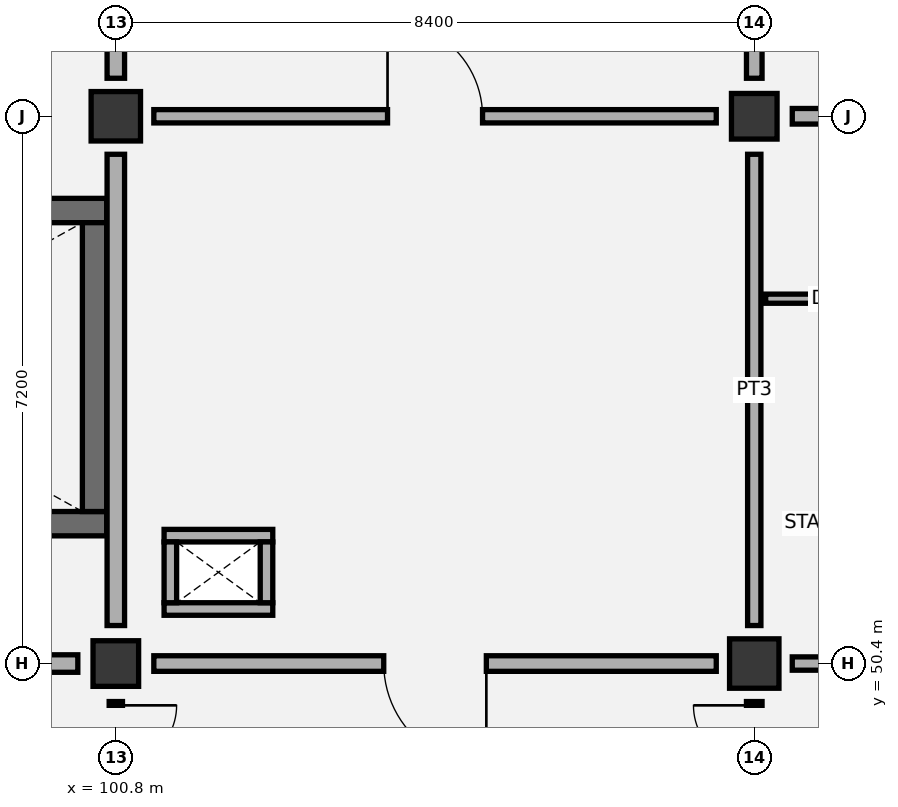
"""IFC4 building model, lengths in metres.
Left out: names, types, materials, properties, quantities, classifications, styles, units other than length and angle.
Written with IfcOpenShell. Run it as: python <this file> out.ifc"""

import sys

from ifc_helpers import new_model, si_unit, direction, frame, frame_2d, origin, origin_2d, place, context, subcontext, project, spatial, rectangle, extrude, element, fill, save


model = new_model("IFC4")
c1 = context("Model", 3, precision=1e-05, world=origin(), true_north=direction((0.0, 1.0)))
c2 = subcontext(c1, "Body", "Model", "MODEL_VIEW")
j1 = project(units=[si_unit("LENGTHUNIT", "METRE"), si_unit("PLANEANGLEUNIT", "RADIAN")], contexts=[c1])
p1 = place(None, origin())
s1 = spatial("IfcSite", under=j1, at=p1, CompositionType="ELEMENT")
p2 = place(p1, origin())
s2 = spatial("IfcBuilding", under=s1, at=p2, CompositionType="ELEMENT")
p3 = place(p2, frame((0.0, 0.0, 52.2)))
s3 = spatial("IfcBuildingStorey", under=s2, at=p3, CompositionType="ELEMENT", Elevation=52.2)
p4 = place(p3, frame((100.8, 50.4, 0.0), z_axis=(0.0, 0.0, 1.0), x_axis=(1.0, 0.0, 0.0)))
e1 = element("IfcColumn", 1, at=p4, inside=s3, PredefinedType="COLUMN", context=c2, shape_type="SweptSolid", body=[
    extrude(rectangle(XDim=0.6, YDim=0.6, at=origin_2d()), origin(), (0.0, 0.0, 1.0), 4.2),
])
for number, where, z_axis, x_axis in (
    (2, (100.8, 57.6, 0.0), (0.0, 0.0, 1.0), (1.0, 0.0, 0.0)),
    (3, (109.2, 50.4, 0.0), (0.0, 0.0, 1.0), (1.0, 0.0, 0.0)),
):
    element("IfcColumn", number, at=place(p3, frame(where, z_axis=z_axis, x_axis=x_axis)), inside=s3, PredefinedType="COLUMN", context=c2, shape_type="SweptSolid", body=[
        extrude(rectangle(XDim=0.65, YDim=0.65, at=origin_2d()), origin(), (0.0, 0.0, 1.0), 4.2),
    ])
p5 = place(p3, frame((109.2, 57.6, 0.0), z_axis=(0.0, 0.0, 1.0), x_axis=(1.0, 0.0, 0.0)))
e4 = element("IfcColumn", 4, at=p5, inside=s3, PredefinedType="COLUMN", context=c2, shape_type="SweptSolid", body=[
    extrude(rectangle(XDim=0.6, YDim=0.6, at=origin_2d()), origin(), (0.0, 0.0, 1.0), 4.2),
])
p6 = place(p3, frame((93.2, 52.24, 0.0), z_axis=(0.0, 0.0, 1.0), x_axis=(1.0, 0.0, 0.0)))
e5 = element("IfcWall", 5, at=p6, inside=s3, PredefinedType="SHEAR", context=c2, shape_type="SweptSolid", body=[
    extrude(rectangle(XDim=7.48, YDim=0.32, at=frame_2d((3.74, 0.0))), origin(), (0.0, 0.0, 1.0), 3.92),
])
p7 = place(p6, frame((0.45, 0.0, 0.0)))
e6 = element("IfcOpeningElement", 6, at=p7, cuts=e5, PredefinedType="OPENING", context=c2, shape_type="SweptSolid", body=[
    extrude(rectangle(XDim=1.05, YDim=2.15, at=frame_2d((0.525, 1.075))), frame((0.0, 0.17, 0.0), z_axis=(0.0, -1.0, 0.0), x_axis=(1.0, 0.0, 0.0)), (0.0, 0.0, 1.0), 0.34),
])
p8 = place(p3, frame((93.2, 56.36, 0.0), z_axis=(0.0, 0.0, 1.0), x_axis=(1.0, 0.0, 0.0)))
e7 = element("IfcWall", 7, at=p8, inside=s3, PredefinedType="SHEAR", context=c2, shape_type="SweptSolid", body=[
    extrude(rectangle(XDim=7.48, YDim=0.32, at=frame_2d((3.74, 0.0))), origin(), (0.0, 0.0, 1.0), 3.92),
])
p9 = place(p3, frame((100.52, 52.4, 0.0), z_axis=(0.0, 0.0, 1.0), x_axis=(0.0, 1.0, 0.0)))
e8 = element("IfcWall", 8, at=p9, inside=s3, PredefinedType="SHEAR", context=c2, shape_type="SweptSolid", body=[
    extrude(rectangle(XDim=3.8, YDim=0.32, at=frame_2d((1.9, 0.0))), origin(), (0.0, 0.0, 1.0), 3.92),
])
for number, where, z_axis, x_axis in (
    (9, (101.435, 51.117, 0.0), (0.0, 0.0, 1.0), (1.0, 0.0, 0.0)),
    (10, (101.435, 52.083, 0.0), (0.0, 0.0, 1.0), (1.0, 0.0, 0.0)),
):
    element("IfcWall", number, at=place(p3, frame(where, z_axis=z_axis, x_axis=x_axis)), inside=s3, PredefinedType="PARTITIONING", context=c2, shape_type="SweptSolid", body=[
        extrude(rectangle(XDim=1.43, YDim=0.165, at=frame_2d((0.715, 0.0))), origin(), (0.0, 0.0, 1.0), 3.92),
    ])
for number, where, z_axis, x_axis in (
    (11, (101.518, 51.2, 0.0), (0.0, 0.0, 1.0), (0.0, 1.0, 0.0)),
    (12, (102.782, 51.2, 0.0), (0.0, 0.0, 1.0), (0.0, 1.0, 0.0)),
):
    element("IfcWall", number, at=place(p3, frame(where, z_axis=z_axis, x_axis=x_axis)), inside=s3, PredefinedType="PARTITIONING", context=c2, shape_type="SweptSolid", body=[
        extrude(rectangle(XDim=0.8, YDim=0.165, at=frame_2d((0.4, 0.0))), origin(), (0.0, 0.0, 1.0), 3.92),
    ])
p10 = place(p3, frame((109.35, 55.2, 0.0), z_axis=(0.0, 0.0, 1.0), x_axis=(1.0, 0.0, 0.0)))
e13 = element("IfcWall", 13, at=p10, inside=s3, PredefinedType="PARTITIONING", context=c2, shape_type="SweptSolid", body=[
    extrude(rectangle(XDim=8.1, YDim=0.12, at=frame_2d((4.05, 0.0))), origin(), (0.0, 0.0, 1.0), 3.92),
])
p11 = place(p10, frame((1.08, 0.0, 0.0)))
e14 = element("IfcOpeningElement", 14, at=p11, cuts=e13, PredefinedType="OPENING", context=c2, shape_type="SweptSolid", body=[
    extrude(rectangle(XDim=0.95, YDim=2.1, at=frame_2d((0.475, 1.05))), frame((0.0, 0.07, 0.0), z_axis=(0.0, -1.0, 0.0), x_axis=(1.0, 0.0, 0.0)), (0.0, 0.0, 1.0), 0.14),
])
p12 = place(p10, frame((3.63, 0.0, 0.0)))
e15 = element("IfcOpeningElement", 15, at=p12, cuts=e13, PredefinedType="OPENING", context=c2, shape_type="SweptSolid", body=[
    extrude(rectangle(XDim=0.9, YDim=2.1, at=frame_2d((0.45, 1.05))), frame((0.0, 0.07, 0.0), z_axis=(0.0, -1.0, 0.0), x_axis=(1.0, 0.0, 0.0)), (0.0, 0.0, 1.0), 0.14),
])
p13 = place(p10, frame((6.13, 0.0, 0.0)))
e16 = element("IfcOpeningElement", 16, at=p13, cuts=e13, PredefinedType="OPENING", context=c2, shape_type="SweptSolid", body=[
    extrude(rectangle(XDim=1.0, YDim=2.1, at=frame_2d((0.5, 1.05))), frame((0.0, 0.07, 0.0), z_axis=(0.0, -1.0, 0.0), x_axis=(1.0, 0.0, 0.0)), (0.0, 0.0, 1.0), 0.14),
])
p14 = place(p3, frame((100.8, 43.7, 0.0), z_axis=(0.0, 0.0, 1.0), x_axis=(0.0, 1.0, 0.0)))
e17 = element("IfcWall", 17, at=p14, inside=s3, PredefinedType="PARTITIONING", context=c2, shape_type="SweptSolid", body=[
    extrude(rectangle(XDim=6.2, YDim=0.175, at=frame_2d((3.1, 0.0))), origin(), (0.0, 0.0, 1.0), 3.415),
])
p15 = place(p14, frame((4.55, 0.0, 0.0)))
e18 = element("IfcOpeningElement", 18, at=p15, cuts=e17, PredefinedType="OPENING", context=c2, shape_type="SweptSolid", body=[
    extrude(rectangle(XDim=1.6, YDim=2.2, at=frame_2d((0.8, 1.1))), frame((0.0, 0.097, 0.0), z_axis=(0.0, -1.0, 0.0), x_axis=(1.0, 0.0, 0.0)), (0.0, 0.0, 1.0), 0.195),
])
p16 = place(p3, frame((92.9, 50.4, 0.0), z_axis=(0.0, 0.0, 1.0), x_axis=(1.0, 0.0, 0.0)))
e19 = element("IfcWall", 19, at=p16, inside=s3, PredefinedType="PARTITIONING", context=c2, shape_type="SweptSolid", body=[
    extrude(rectangle(XDim=7.4, YDim=0.23, at=frame_2d((3.7, 0.0))), origin(), (0.0, 0.0, 1.0), 3.515),
])
p17 = place(p16, frame((2.95, 0.0, 0.0)))
e20 = element("IfcOpeningElement", 20, at=p17, cuts=e19, PredefinedType="OPENING", context=c2, shape_type="SweptSolid", body=[
    extrude(rectangle(XDim=1.5, YDim=2.15, at=frame_2d((0.75, 1.075))), frame((0.0, 0.125, 0.0), z_axis=(0.0, -1.0, 0.0), x_axis=(1.0, 0.0, 0.0)), (0.0, 0.0, 1.0), 0.25),
])
p18 = place(p3, frame((100.8, 50.9, 0.0), z_axis=(0.0, 0.0, 1.0), x_axis=(0.0, 1.0, 0.0)))
e21 = element("IfcWall", 21, at=p18, inside=s3, PredefinedType="PARTITIONING", context=c2, shape_type="SweptSolid", body=[
    extrude(rectangle(XDim=6.2, YDim=0.23, at=frame_2d((3.1, 0.0))), origin(), (0.0, 0.0, 1.0), 3.515),
])
p19 = place(p3, frame((100.8, 58.1, 0.0), z_axis=(0.0, 0.0, 1.0), x_axis=(0.0, 1.0, 0.0)))
e22 = element("IfcWall", 22, at=p19, inside=s3, PredefinedType="PARTITIONING", context=c2, shape_type="SweptSolid", body=[
    extrude(rectangle(XDim=6.2, YDim=0.23, at=frame_2d((3.1, 0.0))), origin(), (0.0, 0.0, 1.0), 3.415),
])
p20 = place(p3, frame((109.2, 43.7, 0.0), z_axis=(0.0, 0.0, 1.0), x_axis=(0.0, 1.0, 0.0)))
e23 = element("IfcWall", 23, at=p20, inside=s3, PredefinedType="PARTITIONING", context=c2, shape_type="SweptSolid", body=[
    extrude(rectangle(XDim=6.2, YDim=0.205, at=frame_2d((3.1, 0.0))), origin(), (0.0, 0.0, 1.0), 3.515),
])
p21 = place(p20, frame((4.55, 0.0, 0.0)))
e24 = element("IfcOpeningElement", 24, at=p21, cuts=e23, PredefinedType="OPENING", context=c2, shape_type="SweptSolid", body=[
    extrude(rectangle(XDim=1.6, YDim=2.2, at=frame_2d((0.8, 1.1))), frame((0.0, 0.113, 0.0), z_axis=(0.0, -1.0, 0.0), x_axis=(1.0, 0.0, 0.0)), (0.0, 0.0, 1.0), 0.225),
])
p22 = place(p3, frame((101.3, 50.4, 0.0), z_axis=(0.0, 0.0, 1.0), x_axis=(1.0, 0.0, 0.0)))
e25 = element("IfcWall", 25, at=p22, inside=s3, PredefinedType="PARTITIONING", context=c2, shape_type="SweptSolid", body=[
    extrude(rectangle(XDim=7.4, YDim=0.205, at=frame_2d((3.7, 0.0))), origin(), (0.0, 0.0, 1.0), 3.565),
])
p23 = place(p22, frame((3.025, 0.0, 0.0)))
e26 = element("IfcOpeningElement", 26, at=p23, cuts=e25, PredefinedType="OPENING", context=c2, shape_type="SweptSolid", body=[
    extrude(rectangle(XDim=1.35, YDim=2.15, at=frame_2d((0.675, 1.075))), frame((0.0, 0.113, 0.0), z_axis=(0.0, -1.0, 0.0), x_axis=(1.0, 0.0, 0.0)), (0.0, 0.0, 1.0), 0.225),
])
p24 = place(p3, frame((109.2, 50.9, 0.0), z_axis=(0.0, 0.0, 1.0), x_axis=(0.0, 1.0, 0.0)))
e27 = element("IfcWall", 27, at=p24, inside=s3, PredefinedType="PARTITIONING", context=c2, shape_type="SweptSolid", body=[
    extrude(rectangle(XDim=6.2, YDim=0.175, at=frame_2d((3.1, 0.0))), origin(), (0.0, 0.0, 1.0), 3.415),
])
p25 = place(p3, frame((101.3, 57.6, 0.0), z_axis=(0.0, 0.0, 1.0), x_axis=(1.0, 0.0, 0.0)))
e28 = element("IfcWall", 28, at=p25, inside=s3, PredefinedType="PARTITIONING", context=c2, shape_type="SweptSolid", body=[
    extrude(rectangle(XDim=7.4, YDim=0.175, at=frame_2d((3.7, 0.0))), origin(), (0.0, 0.0, 1.0), 3.565),
])
p26 = place(p25, frame((3.075, 0.0, 0.0)))
e29 = element("IfcOpeningElement", 29, at=p26, cuts=e28, PredefinedType="OPENING", context=c2, shape_type="SweptSolid", body=[
    extrude(rectangle(XDim=1.25, YDim=2.1, at=frame_2d((0.625, 1.05))), frame((0.0, 0.097, 0.0), z_axis=(0.0, -1.0, 0.0), x_axis=(1.0, 0.0, 0.0)), (0.0, 0.0, 1.0), 0.195),
])
p27 = place(p3, frame((109.2, 58.1, 0.0), z_axis=(0.0, 0.0, 1.0), x_axis=(0.0, 1.0, 0.0)))
e30 = element("IfcWall", 30, at=p27, inside=s3, PredefinedType="PARTITIONING", context=c2, shape_type="SweptSolid", body=[
    extrude(rectangle(XDim=6.2, YDim=0.205, at=frame_2d((3.1, 0.0))), origin(), (0.0, 0.0, 1.0), 3.625),
])
p28 = place(p27, frame((2.35, 0.0, 0.0)))
e31 = element("IfcOpeningElement", 31, at=p28, cuts=e30, PredefinedType="OPENING", context=c2, shape_type="SweptSolid", body=[
    extrude(rectangle(XDim=1.5, YDim=2.2, at=frame_2d((0.75, 1.1))), frame((0.0, 0.113, 0.0), z_axis=(0.0, -1.0, 0.0), x_axis=(1.0, 0.0, 0.0)), (0.0, 0.0, 1.0), 0.225),
])
p29 = place(p3, frame((109.7, 50.4, 0.0), z_axis=(0.0, 0.0, 1.0), x_axis=(1.0, 0.0, 0.0)))
e32 = element("IfcWall", 32, at=p29, inside=s3, PredefinedType="PARTITIONING", context=c2, shape_type="SweptSolid", body=[
    extrude(rectangle(XDim=7.4, YDim=0.175, at=frame_2d((3.7, 0.0))), origin(), (0.0, 0.0, 1.0), 3.365),
])
p30 = place(p3, frame((109.7, 57.6, 0.0), z_axis=(0.0, 0.0, 1.0), x_axis=(1.0, 0.0, 0.0)))
e33 = element("IfcWall", 33, at=p30, inside=s3, PredefinedType="PARTITIONING", context=c2, shape_type="SweptSolid", body=[
    extrude(rectangle(XDim=7.4, YDim=0.205, at=frame_2d((3.7, 0.0))), origin(), (0.0, 0.0, 1.0), 3.365),
])
p31 = place(p30, frame((2.975, 0.0, 0.0)))
e34 = element("IfcOpeningElement", 34, at=p31, cuts=e33, PredefinedType="OPENING", context=c2, shape_type="SweptSolid", body=[
    extrude(rectangle(XDim=1.45, YDim=2.2, at=frame_2d((0.725, 1.1))), frame((0.0, 0.113, 0.0), z_axis=(0.0, -1.0, 0.0), x_axis=(1.0, 0.0, 0.0)), (0.0, 0.0, 1.0), 0.225),
])
p32 = place(p15, frame((1.6, 0.0, 0.0), z_axis=(0.0, 0.0, 1.0), x_axis=(-1.0, 0.0, 0.0)))
e35 = element("IfcDoor", 35, at=p32, inside=s3, OperationType="DOUBLE_DOOR_SINGLE_SWING", PredefinedType="DOOR", context=c2, shape_type="SweptSolid", body=[
    extrude(rectangle(XDim=1.6, YDim=2.2, at=frame_2d((0.8, 1.1))), frame((0.0, 0.025, 0.0), z_axis=(0.0, -1.0, 0.0), x_axis=(1.0, 0.0, 0.0)), (0.0, 0.0, 1.0), 0.05),
])
fill(e18, e35)
p33 = place(p21, origin())
e36 = element("IfcDoor", 36, at=p33, inside=s3, OperationType="DOUBLE_DOOR_SINGLE_SWING", PredefinedType="DOOR", context=c2, shape_type="SweptSolid", body=[
    extrude(rectangle(XDim=1.6, YDim=2.2, at=frame_2d((0.8, 1.1))), frame((0.0, 0.025, 0.0), z_axis=(0.0, -1.0, 0.0), x_axis=(1.0, 0.0, 0.0)), (0.0, 0.0, 1.0), 0.05),
])
fill(e24, e36)
p34 = place(p23, frame((1.35, 0.0, 0.0), z_axis=(0.0, 0.0, 1.0), x_axis=(-1.0, 0.0, 0.0)))
e37 = element("IfcDoor", 37, at=p34, inside=s3, OperationType="SINGLE_SWING_LEFT", PredefinedType="DOOR", context=c2, shape_type="SweptSolid", body=[
    extrude(rectangle(XDim=1.35, YDim=2.15, at=frame_2d((0.675, 1.075))), frame((0.0, 0.025, 0.0), z_axis=(0.0, -1.0, 0.0), x_axis=(1.0, 0.0, 0.0)), (0.0, 0.0, 1.0), 0.05),
])
fill(e26, e37)
p35 = place(p26, origin())
e38 = element("IfcDoor", 38, at=p35, inside=s3, OperationType="SINGLE_SWING_LEFT", PredefinedType="DOOR", context=c2, shape_type="SweptSolid", body=[
    extrude(rectangle(XDim=1.25, YDim=2.1, at=frame_2d((0.625, 1.05))), frame((0.0, 0.025, 0.0), z_axis=(0.0, -1.0, 0.0), x_axis=(1.0, 0.0, 0.0)), (0.0, 0.0, 1.0), 0.05),
])
fill(e29, e38)
save(model, sys.argv[1])
